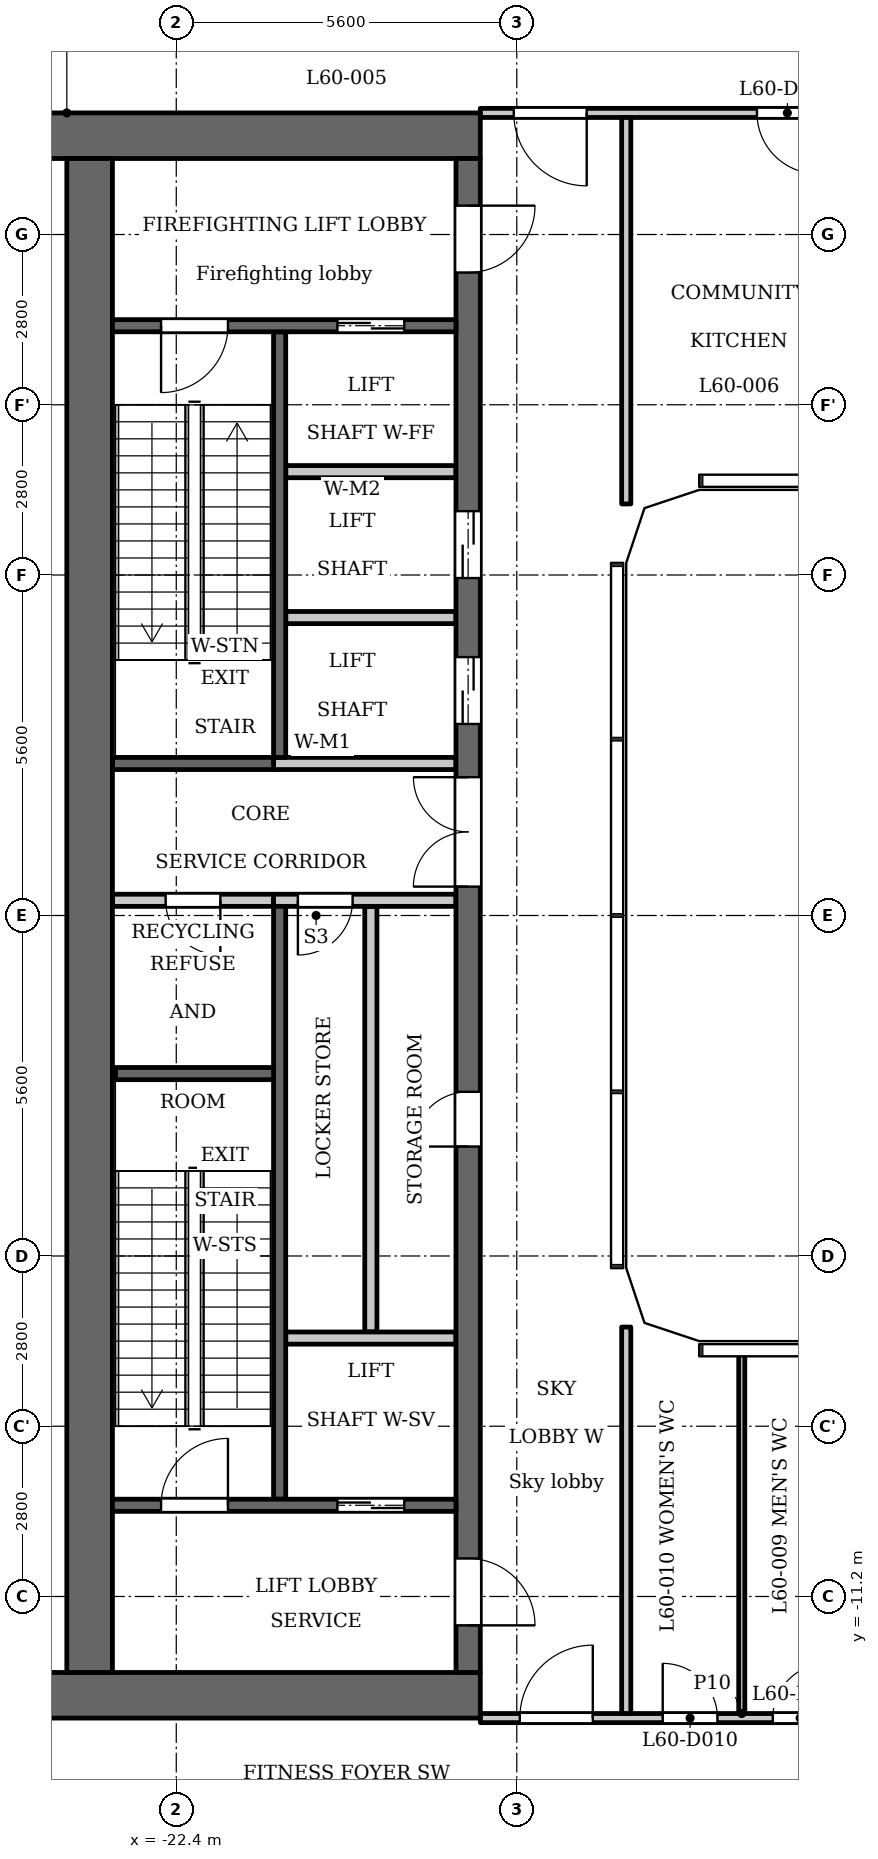
"""IFC4 building model, lengths in metres.
Left out: names, types, materials, properties, quantities, classifications, styles, units other than length and angle.
Written with IfcOpenShell. Run it as: python <this file> out.ifc"""

import sys

from ifc_helpers import new_model, si_unit, direction, frame, frame_2d, origin, place, context, subcontext, project, spatial, polyline, rectangle, outline, extrude, element, fill, save


model = new_model("IFC4")
c1 = context("Model", 3, precision=1e-05, world=origin(), true_north=direction((0.0, 1.0)))
c2 = subcontext(c1, "Body", "Model", "MODEL_VIEW")
j1 = project(units=[si_unit("LENGTHUNIT", "METRE"), si_unit("PLANEANGLEUNIT", "RADIAN")], contexts=[c1])
p1 = place(None, origin())
s1 = spatial("IfcSite", under=j1, at=p1, CompositionType="ELEMENT")
p2 = place(p1, origin())
s2 = spatial("IfcBuilding", under=s1, at=p2, CompositionType="ELEMENT")
p3 = place(p2, frame((0.0, 0.0, 230.9)))
s3 = spatial("IfcBuildingStorey", under=s2, at=p3, CompositionType="ELEMENT", Elevation=230.9)
p4 = place(p3, frame((-20.7, 2.6, 0.0), z_axis=(0.0, 0.0, 1.0), x_axis=(0.0, 1.0, 0.0)))
e1 = element("IfcWall", 1, at=p4, inside=s3, PredefinedType="SHEAR", context=c2, shape_type="SweptSolid", body=[
    extrude(rectangle(XDim=7.0, YDim=0.2, at=frame_2d((3.5, 0.0))), origin(), (0.0, 0.0, 1.0), 4.95),
])
p5 = place(p3, frame((-20.7, -9.6, 0.0), z_axis=(0.0, 0.0, 1.0), x_axis=(0.0, 1.0, 0.0)))
e2 = element("IfcWall", 2, at=p5, inside=s3, PredefinedType="SHEAR", context=c2, shape_type="SweptSolid", body=[
    extrude(rectangle(XDim=9.75, YDim=0.2, at=frame_2d((4.875, 0.0))), origin(), (0.0, 0.0, 1.0), 4.95),
])
p6 = place(p3, frame((-20.8, 2.5, 0.0), z_axis=(0.0, 0.0, 1.0), x_axis=(-1.0, 0.0, 0.0)))
e3 = element("IfcWall", 3, at=p6, inside=s3, PredefinedType="SHEAR", context=c2, shape_type="SweptSolid", body=[
    extrude(rectangle(XDim=2.65, YDim=0.2, at=frame_2d((1.325, 0.0))), origin(), (0.0, 0.0, 1.0), 4.95),
])
p7 = place(p3, frame((-20.8, 0.25, 0.0), z_axis=(0.0, 0.0, 1.0), x_axis=(-1.0, 0.0, 0.0)))
e4 = element("IfcWall", 4, at=p7, inside=s3, PredefinedType="PARTITIONING", context=c2, shape_type="SweptSolid", body=[
    extrude(rectangle(XDim=2.65, YDim=0.2, at=frame_2d((1.325, 0.0))), origin(), (0.0, 0.0, 1.0), 4.95),
])
p8 = place(p7, frame((0.875, 0.0, 0.0)))
e5 = element("IfcOpeningElement", 5, at=p8, cuts=e4, PredefinedType="OPENING", context=c2, shape_type="SweptSolid", body=[
    extrude(rectangle(XDim=0.9, YDim=2.1, at=frame_2d((0.45, 1.05))), frame((0.0, 0.11, 0.0), z_axis=(0.0, -1.0, 0.0), x_axis=(1.0, 0.0, 0.0)), (0.0, 0.0, 1.0), 0.22),
])
for number, where, z_axis, x_axis in (
    (6, (-17.4, 12.825, 0.0), (0.0, 0.0, 1.0), (-1.0, 0.0, 0.0)),
    (7, (-17.4, -12.825, 0.0), (0.0, 0.0, 1.0), (-1.0, 0.0, 0.0)),
):
    element("IfcWall", number, at=place(p3, frame(where, z_axis=z_axis, x_axis=x_axis)), inside=s3, PredefinedType="SHEAR", context=c2, shape_type="SweptSolid", body=[
        extrude(rectangle(XDim=7.6, YDim=0.75, at=frame_2d((3.8, 0.0))), origin(), (0.0, 0.0, 1.0), 4.95),
    ])
p9 = place(p3, frame((-19.2, -6.85, 0.0), z_axis=(0.0, 0.0, 1.0), x_axis=(0.0, 1.0, 0.0)))
e8 = element("IfcWall", 8, at=p9, inside=s3, PredefinedType="PARTITIONING", context=c2, shape_type="SweptSolid", body=[
    extrude(rectangle(XDim=7.0, YDim=0.2, at=frame_2d((3.5, 0.0))), origin(), (0.0, 0.0, 1.0), 4.95),
])
p10 = place(p3, frame((-17.6, -12.45, 0.0), z_axis=(0.0, 0.0, 1.0), x_axis=(0.0, 1.0, 0.0)))
e9 = element("IfcWall", 9, at=p10, inside=s3, PredefinedType="SHEAR", context=c2, shape_type="SweptSolid", body=[
    extrude(rectangle(XDim=24.9, YDim=0.4, at=frame_2d((12.45, 0.0))), origin(), (0.0, 0.0, 1.0), 4.95),
])
p11 = place(p10, frame((8.65, 0.0, 0.0)))
e10 = element("IfcOpeningElement", 10, at=p11, cuts=e9, PredefinedType="OPENING", context=c2, shape_type="SweptSolid", body=[
    extrude(rectangle(XDim=0.9, YDim=2.1, at=frame_2d((0.45, 1.05))), frame((0.0, 0.21, 0.0), z_axis=(0.0, -1.0, 0.0), x_axis=(1.0, 0.0, 0.0)), (0.0, 0.0, 1.0), 0.42),
])
p12 = place(p10, frame((15.6, 0.0, 0.0)))
e11 = element("IfcOpeningElement", 11, at=p12, cuts=e9, PredefinedType="OPENING", context=c2, shape_type="SweptSolid", body=[
    extrude(rectangle(XDim=1.1, YDim=2.1, at=frame_2d((0.55, 1.05))), frame((0.0, 0.21, 0.0), z_axis=(0.0, -1.0, 0.0), x_axis=(1.0, 0.0, 0.0)), (0.0, 0.0, 1.0), 0.42),
])
p13 = place(p10, frame((18.0, 0.0, 0.0)))
e12 = element("IfcOpeningElement", 12, at=p13, cuts=e9, PredefinedType="OPENING", context=c2, shape_type="SweptSolid", body=[
    extrude(rectangle(XDim=1.1, YDim=2.1, at=frame_2d((0.55, 1.05))), frame((0.0, 0.21, 0.0), z_axis=(0.0, -1.0, 0.0), x_axis=(1.0, 0.0, 0.0)), (0.0, 0.0, 1.0), 0.42),
])
p14 = place(p10, frame((23.025, 0.0, 0.0)))
e13 = element("IfcOpeningElement", 13, at=p14, cuts=e9, PredefinedType="OPENING", context=c2, shape_type="SweptSolid", body=[
    extrude(rectangle(XDim=1.1, YDim=2.1, at=frame_2d((0.55, 1.05))), frame((0.0, 0.21, 0.0), z_axis=(0.0, -1.0, 0.0), x_axis=(1.0, 0.0, 0.0)), (0.0, 0.0, 1.0), 0.42),
])
p15 = place(p10, frame((0.775, 0.0, 0.0)))
e14 = element("IfcOpeningElement", 14, at=p15, cuts=e9, PredefinedType="OPENING", context=c2, shape_type="SweptSolid", body=[
    extrude(rectangle(XDim=1.1, YDim=2.1, at=frame_2d((0.55, 1.05))), frame((0.0, 0.21, 0.0), z_axis=(0.0, -1.0, 0.0), x_axis=(1.0, 0.0, 0.0)), (0.0, 0.0, 1.0), 0.42),
])
p16 = place(p10, frame((12.925, 0.0, 0.0)))
e15 = element("IfcOpeningElement", 15, at=p16, cuts=e9, PredefinedType="OPENING", context=c2, shape_type="SweptSolid", body=[
    extrude(rectangle(XDim=1.8, YDim=2.1, at=frame_2d((0.9, 1.05))), frame((0.0, 0.21, 0.0), z_axis=(0.0, -1.0, 0.0), x_axis=(1.0, 0.0, 0.0)), (0.0, 0.0, 1.0), 0.42),
])
p17 = place(p3, frame((-23.825, -12.45, 0.0), z_axis=(0.0, 0.0, 1.0), x_axis=(0.0, 1.0, 0.0)))
e16 = element("IfcWall", 16, at=p17, inside=s3, PredefinedType="SHEAR", context=c2, shape_type="SweptSolid", body=[
    extrude(rectangle(XDim=24.9, YDim=0.75, at=frame_2d((12.45, 0.0))), origin(), (0.0, 0.0, 1.0), 4.95),
])
p18 = place(p3, frame((-17.8, -9.7, 0.0), z_axis=(0.0, 0.0, 1.0), x_axis=(-1.0, 0.0, 0.0)))
e17 = element("IfcWall", 17, at=p18, inside=s3, PredefinedType="SHEAR", context=c2, shape_type="SweptSolid", body=[
    extrude(rectangle(XDim=5.65, YDim=0.2, at=frame_2d((2.825, 0.0))), origin(), (0.0, 0.0, 1.0), 4.95),
])
p19 = place(p18, frame((0.85, 0.0, 0.0)))
e18 = element("IfcOpeningElement", 18, at=p19, cuts=e17, PredefinedType="OPENING", context=c2, shape_type="SweptSolid", body=[
    extrude(rectangle(XDim=1.1, YDim=2.1, at=frame_2d((0.55, 1.05))), frame((0.0, 0.11, 0.0), z_axis=(0.0, -1.0, 0.0), x_axis=(1.0, 0.0, 0.0)), (0.0, 0.0, 1.0), 0.22),
])
p20 = place(p18, frame((3.75, 0.0, 0.0)))
e19 = element("IfcOpeningElement", 19, at=p20, cuts=e17, PredefinedType="OPENING", context=c2, shape_type="SweptSolid", body=[
    extrude(rectangle(XDim=1.1, YDim=2.1, at=frame_2d((0.55, 1.05))), frame((0.0, 0.11, 0.0), z_axis=(0.0, -1.0, 0.0), x_axis=(1.0, 0.0, 0.0)), (0.0, 0.0, 1.0), 0.22),
])
p21 = place(p3, frame((-17.8, -6.95, 0.0), z_axis=(0.0, 0.0, 1.0), x_axis=(-1.0, 0.0, 0.0)))
e20 = element("IfcWall", 20, at=p21, inside=s3, PredefinedType="PARTITIONING", context=c2, shape_type="SweptSolid", body=[
    extrude(rectangle(XDim=2.8, YDim=0.2, at=frame_2d((1.4, 0.0))), origin(), (0.0, 0.0, 1.0), 4.95),
])
p22 = place(p3, frame((-17.8, 0.25, 0.0), z_axis=(0.0, 0.0, 1.0), x_axis=(-1.0, 0.0, 0.0)))
e21 = element("IfcWall", 21, at=p22, inside=s3, PredefinedType="PARTITIONING", context=c2, shape_type="SweptSolid", body=[
    extrude(rectangle(XDim=3.0, YDim=0.2, at=frame_2d((1.5, 0.0))), origin(), (0.0, 0.0, 1.0), 4.95),
])
p23 = place(p22, frame((1.7, 0.0, 0.0)))
e22 = element("IfcOpeningElement", 22, at=p23, cuts=e21, PredefinedType="OPENING", context=c2, shape_type="SweptSolid", body=[
    extrude(rectangle(XDim=0.9, YDim=2.1, at=frame_2d((0.45, 1.05))), frame((0.0, 0.11, 0.0), z_axis=(0.0, -1.0, 0.0), x_axis=(1.0, 0.0, 0.0)), (0.0, 0.0, 1.0), 0.22),
])
p24 = place(p3, frame((-17.8, 2.5, 0.0), z_axis=(0.0, 0.0, 1.0), x_axis=(-1.0, 0.0, 0.0)))
e23 = element("IfcWall", 23, at=p24, inside=s3, PredefinedType="PARTITIONING", context=c2, shape_type="SweptSolid", body=[
    extrude(rectangle(XDim=3.0, YDim=0.2, at=frame_2d((1.5, 0.0))), origin(), (0.0, 0.0, 1.0), 4.95),
])
for number, where, z_axis, x_axis in (
    (24, (-17.8, 4.9, 0.0), (0.0, 0.0, 1.0), (-1.0, 0.0, 0.0)),
    (25, (-17.8, 7.3, 0.0), (0.0, 0.0, 1.0), (-1.0, 0.0, 0.0)),
):
    element("IfcWall", number, at=place(p3, frame(where, z_axis=z_axis, x_axis=x_axis)), inside=s3, PredefinedType="PARTITIONING", context=c2, shape_type="SweptSolid", body=[
        extrude(rectangle(XDim=2.8, YDim=0.2, at=frame_2d((1.4, 0.0))), origin(), (0.0, 0.0, 1.0), 4.95),
    ])
p25 = place(p3, frame((-17.8, 9.7, 0.0), z_axis=(0.0, 0.0, 1.0), x_axis=(-1.0, 0.0, 0.0)))
e26 = element("IfcWall", 26, at=p25, inside=s3, PredefinedType="SHEAR", context=c2, shape_type="SweptSolid", body=[
    extrude(rectangle(XDim=5.65, YDim=0.2, at=frame_2d((2.825, 0.0))), origin(), (0.0, 0.0, 1.0), 4.95),
])
p26 = place(p25, frame((0.85, 0.0, 0.0)))
e27 = element("IfcOpeningElement", 27, at=p26, cuts=e26, PredefinedType="OPENING", context=c2, shape_type="SweptSolid", body=[
    extrude(rectangle(XDim=1.1, YDim=2.1, at=frame_2d((0.55, 1.05))), frame((0.0, 0.11, 0.0), z_axis=(0.0, -1.0, 0.0), x_axis=(1.0, 0.0, 0.0)), (0.0, 0.0, 1.0), 0.22),
])
p27 = place(p25, frame((3.75, 0.0, 0.0)))
e28 = element("IfcOpeningElement", 28, at=p27, cuts=e26, PredefinedType="OPENING", context=c2, shape_type="SweptSolid", body=[
    extrude(rectangle(XDim=1.1, YDim=2.1, at=frame_2d((0.55, 1.05))), frame((0.0, 0.11, 0.0), z_axis=(0.0, -1.0, 0.0), x_axis=(1.0, 0.0, 0.0)), (0.0, 0.0, 1.0), 0.22),
])
p28 = place(p3, frame((-20.8, -2.6, 0.0), z_axis=(0.0, 0.0, 1.0), x_axis=(-1.0, 0.0, 0.0)))
e29 = element("IfcWall", 29, at=p28, inside=s3, PredefinedType="SHEAR", context=c2, shape_type="SweptSolid", body=[
    extrude(rectangle(XDim=2.6, YDim=0.2, at=frame_2d((1.3, 0.0))), origin(), (0.0, 0.0, 1.0), 4.95),
])
p29 = place(p3, frame((-17.4, -13.2, 0.0), z_axis=(0.0, 0.0, 1.0), x_axis=(1.0, 0.0, 0.0)))
e30 = element("IfcWall", 30, at=p29, inside=s3, PredefinedType="PARTITIONING", context=c2, shape_type="SweptSolid", body=[
    extrude(rectangle(XDim=6.016, YDim=0.15, at=frame_2d((3.008, 0.0))), origin(), (0.0, 0.0, 1.0), 4.95),
])
p30 = place(p29, frame((0.65, 0.0, 0.0)))
e31 = element("IfcOpeningElement", 31, at=p30, cuts=e30, PredefinedType="OPENING", context=c2, shape_type="SweptSolid", body=[
    extrude(rectangle(XDim=1.2, YDim=2.1, at=frame_2d((0.6, 1.05))), frame((0.0, 0.085, 0.0), z_axis=(0.0, -1.0, 0.0), x_axis=(1.0, 0.0, 0.0)), (0.0, 0.0, 1.0), 0.17),
])
p31 = place(p29, frame((4.81, 0.0, 0.0)))
e32 = element("IfcOpeningElement", 32, at=p31, cuts=e30, PredefinedType="OPENING", context=c2, shape_type="SweptSolid", body=[
    extrude(rectangle(XDim=0.9, YDim=2.1, at=frame_2d((0.45, 1.05))), frame((0.0, 0.085, 0.0), z_axis=(0.0, -1.0, 0.0), x_axis=(1.0, 0.0, 0.0)), (0.0, 0.0, 1.0), 0.17),
])
p32 = place(p29, frame((3.0, 0.0, 0.0)))
e33 = element("IfcOpeningElement", 33, at=p32, cuts=e30, PredefinedType="OPENING", context=c2, shape_type="SweptSolid", body=[
    extrude(rectangle(XDim=0.9, YDim=2.1, at=frame_2d((0.45, 1.05))), frame((0.0, 0.085, 0.0), z_axis=(0.0, -1.0, 0.0), x_axis=(1.0, 0.0, 0.0)), (0.0, 0.0, 1.0), 0.17),
])
p33 = place(p3, frame((-17.4, 13.2, 0.0), z_axis=(0.0, 0.0, 1.0), x_axis=(1.0, 0.0, 0.0)))
e34 = element("IfcWall", 34, at=p33, inside=s3, PredefinedType="PARTITIONING", context=c2, shape_type="SweptSolid", body=[
    extrude(rectangle(XDim=6.016, YDim=0.15, at=frame_2d((3.008, 0.0))), origin(), (0.0, 0.0, 1.0), 4.95),
])
p34 = place(p33, frame((0.55, 0.0, 0.0)))
e35 = element("IfcOpeningElement", 35, at=p34, cuts=e34, PredefinedType="OPENING", context=c2, shape_type="SweptSolid", body=[
    extrude(rectangle(XDim=1.2, YDim=2.1, at=frame_2d((0.6, 1.05))), frame((0.0, 0.085, 0.0), z_axis=(0.0, -1.0, 0.0), x_axis=(1.0, 0.0, 0.0)), (0.0, 0.0, 1.0), 0.17),
])
p35 = place(p33, frame((4.55, 0.0, 0.0)))
e36 = element("IfcOpeningElement", 36, at=p35, cuts=e34, PredefinedType="OPENING", context=c2, shape_type="SweptSolid", body=[
    extrude(rectangle(XDim=1.0, YDim=2.1, at=frame_2d((0.5, 1.05))), frame((0.0, 0.085, 0.0), z_axis=(0.0, -1.0, 0.0), x_axis=(1.0, 0.0, 0.0)), (0.0, 0.0, 1.0), 0.17),
])
for number, where, z_axis, x_axis in (
    (37, (-15.0, -13.125, 0.0), (0.0, 0.0, 1.0), (0.0, 1.0, 0.0)),
    (38, (-15.0, 6.769, 0.0), (0.0, 0.0, 1.0), (0.0, 1.0, 0.0)),
):
    element("IfcWall", number, at=place(p3, frame(where, z_axis=z_axis, x_axis=x_axis)), inside=s3, PredefinedType="PARTITIONING", context=c2, shape_type="SweptSolid", body=[
        extrude(rectangle(XDim=6.356, YDim=0.15, at=frame_2d((3.178, 0.0))), origin(), (0.0, 0.0, 1.0), 4.95),
    ])
p36 = place(p3, frame((-13.1, -13.125, 0.0), z_axis=(0.0, 0.0, 1.0), x_axis=(0.0, 1.0, 0.0)))
e39 = element("IfcWall", 39, at=p36, inside=s3, PredefinedType="PARTITIONING", context=c2, shape_type="SweptSolid", body=[
    extrude(rectangle(XDim=5.941, YDim=0.1, at=frame_2d((2.97, 0.0))), origin(), (0.0, 0.0, 1.0), 4.95),
])
p37 = place(p3, origin())
e40 = element("IfcWall", 40, at=p37, inside=s3, PredefinedType="SOLIDWALL", context=c2, shape_type="SweptSolid", body=[
    extrude(outline(polyline([(-15.0, 5.8), (-14.7, 6.7), (-13.8, 7.0), (-13.8, 7.3), (-13.849, 7.3), (-14.937, 6.937), (-15.3, 5.849), (-15.3, 5.8), (-15.0, 5.8)])), origin(), (0.0, 0.0, 1.0), 4.95),
])
e41 = element("IfcWall", 41, at=p37, inside=s3, PredefinedType="SOLIDWALL", context=c2, shape_type="SweptSolid", body=[
    extrude(outline(polyline([(-13.8, -7.0), (-14.7, -6.7), (-15.0, -5.8), (-15.3, -5.8), (-15.3, -5.849), (-14.937, -6.937), (-13.849, -7.3), (-13.8, -7.3), (-13.8, -7.0)])), origin(), (0.0, 0.0, 1.0), 4.95),
])
p38 = place(p19, origin())
e42 = element("IfcDoor", 42, at=p38, inside=s3, OperationType="DOUBLE_DOOR_SLIDING", PredefinedType="DOOR", context=c2, shape_type="SweptSolid", body=[
    extrude(rectangle(XDim=1.1, YDim=2.1, at=frame_2d((0.55, 1.05))), frame((0.0, 0.025, 0.0), z_axis=(0.0, -1.0, 0.0), x_axis=(1.0, 0.0, 0.0)), (0.0, 0.0, 1.0), 0.05),
])
fill(e18, e42)
p39 = place(p11, origin())
e43 = element("IfcDoor", 43, at=p39, inside=s3, OperationType="SINGLE_SWING_RIGHT", PredefinedType="DOOR", context=c2, shape_type="SweptSolid", body=[
    extrude(rectangle(XDim=0.9, YDim=2.1, at=frame_2d((0.45, 1.05))), frame((0.0, 0.025, 0.0), z_axis=(0.0, -1.0, 0.0), x_axis=(1.0, 0.0, 0.0)), (0.0, 0.0, 1.0), 0.05),
])
fill(e10, e43)
p40 = place(p23, origin())
e44 = element("IfcDoor", 44, at=p40, inside=s3, OperationType="SINGLE_SWING_LEFT", PredefinedType="DOOR", context=c2, shape_type="SweptSolid", body=[
    extrude(rectangle(XDim=0.9, YDim=2.1, at=frame_2d((0.45, 1.05))), frame((0.0, 0.025, 0.0), z_axis=(0.0, -1.0, 0.0), x_axis=(1.0, 0.0, 0.0)), (0.0, 0.0, 1.0), 0.05),
])
fill(e22, e44)
p41 = place(p12, origin())
e45 = element("IfcDoor", 45, at=p41, inside=s3, OperationType="DOUBLE_DOOR_SLIDING", PredefinedType="DOOR", context=c2, shape_type="SweptSolid", body=[
    extrude(rectangle(XDim=1.1, YDim=2.1, at=frame_2d((0.55, 1.05))), frame((0.0, 0.025, 0.0), z_axis=(0.0, -1.0, 0.0), x_axis=(1.0, 0.0, 0.0)), (0.0, 0.0, 1.0), 0.05),
])
fill(e11, e45)
p42 = place(p13, origin())
e46 = element("IfcDoor", 46, at=p42, inside=s3, OperationType="DOUBLE_DOOR_SLIDING", PredefinedType="DOOR", context=c2, shape_type="SweptSolid", body=[
    extrude(rectangle(XDim=1.1, YDim=2.1, at=frame_2d((0.55, 1.05))), frame((0.0, 0.025, 0.0), z_axis=(0.0, -1.0, 0.0), x_axis=(1.0, 0.0, 0.0)), (0.0, 0.0, 1.0), 0.05),
])
fill(e12, e46)
p43 = place(p26, origin())
e47 = element("IfcDoor", 47, at=p43, inside=s3, OperationType="DOUBLE_DOOR_SLIDING", PredefinedType="DOOR", context=c2, shape_type="SweptSolid", body=[
    extrude(rectangle(XDim=1.1, YDim=2.1, at=frame_2d((0.55, 1.05))), frame((0.0, 0.025, 0.0), z_axis=(0.0, -1.0, 0.0), x_axis=(1.0, 0.0, 0.0)), (0.0, 0.0, 1.0), 0.05),
])
fill(e27, e47)
p44 = place(p14, origin())
e48 = element("IfcDoor", 48, at=p44, inside=s3, OperationType="SINGLE_SWING_RIGHT", PredefinedType="DOOR", context=c2, shape_type="SweptSolid", body=[
    extrude(rectangle(XDim=1.1, YDim=2.1, at=frame_2d((0.55, 1.05))), frame((0.0, 0.025, 0.0), z_axis=(0.0, -1.0, 0.0), x_axis=(1.0, 0.0, 0.0)), (0.0, 0.0, 1.0), 0.05),
])
fill(e13, e48)
p45 = place(p15, origin())
e49 = element("IfcDoor", 49, at=p45, inside=s3, OperationType="SINGLE_SWING_LEFT", PredefinedType="DOOR", context=c2, shape_type="SweptSolid", body=[
    extrude(rectangle(XDim=1.1, YDim=2.1, at=frame_2d((0.55, 1.05))), frame((0.0, 0.025, 0.0), z_axis=(0.0, -1.0, 0.0), x_axis=(1.0, 0.0, 0.0)), (0.0, 0.0, 1.0), 0.05),
])
fill(e14, e49)
p46 = place(p27, origin())
e50 = element("IfcDoor", 50, at=p46, inside=s3, OperationType="SINGLE_SWING_LEFT", PredefinedType="DOOR", context=c2, shape_type="SweptSolid", body=[
    extrude(rectangle(XDim=1.1, YDim=2.1, at=frame_2d((0.55, 1.05))), frame((0.0, 0.025, 0.0), z_axis=(0.0, -1.0, 0.0), x_axis=(1.0, 0.0, 0.0)), (0.0, 0.0, 1.0), 0.05),
])
fill(e28, e50)
p47 = place(p20, origin())
e51 = element("IfcDoor", 51, at=p47, inside=s3, OperationType="SINGLE_SWING_LEFT", PredefinedType="DOOR", context=c2, shape_type="SweptSolid", body=[
    extrude(rectangle(XDim=1.1, YDim=2.1, at=frame_2d((0.55, 1.05))), frame((0.0, 0.025, 0.0), z_axis=(0.0, -1.0, 0.0), x_axis=(1.0, 0.0, 0.0)), (0.0, 0.0, 1.0), 0.05),
])
fill(e19, e51)
p48 = place(p16, origin())
e52 = element("IfcDoor", 52, at=p48, inside=s3, OperationType="DOUBLE_DOOR_SINGLE_SWING", PredefinedType="DOOR", context=c2, shape_type="SweptSolid", body=[
    extrude(rectangle(XDim=1.8, YDim=2.1, at=frame_2d((0.9, 1.05))), frame((0.0, 0.025, 0.0), z_axis=(0.0, -1.0, 0.0), x_axis=(1.0, 0.0, 0.0)), (0.0, 0.0, 1.0), 0.05),
])
fill(e15, e52)
p49 = place(p8, origin())
e53 = element("IfcDoor", 53, at=p49, inside=s3, OperationType="SINGLE_SWING_RIGHT", PredefinedType="DOOR", context=c2, shape_type="SweptSolid", body=[
    extrude(rectangle(XDim=0.9, YDim=2.1, at=frame_2d((0.45, 1.05))), frame((0.0, 0.025, 0.0), z_axis=(0.0, -1.0, 0.0), x_axis=(1.0, 0.0, 0.0)), (0.0, 0.0, 1.0), 0.05),
])
fill(e5, e53)
p50 = place(p34, origin())
e54 = element("IfcDoor", 54, at=p50, inside=s3, OperationType="SINGLE_SWING_RIGHT", PredefinedType="DOOR", context=c2, shape_type="SweptSolid", body=[
    extrude(rectangle(XDim=1.2, YDim=2.1, at=frame_2d((0.6, 1.05))), frame((0.0, 0.025, 0.0), z_axis=(0.0, -1.0, 0.0), x_axis=(1.0, 0.0, 0.0)), (0.0, 0.0, 1.0), 0.05),
])
fill(e35, e54)
p51 = place(p35, origin())
e55 = element("IfcDoor", 55, at=p51, inside=s3, OperationType="SINGLE_SWING_RIGHT", PredefinedType="DOOR", context=c2, shape_type="SweptSolid", body=[
    extrude(rectangle(XDim=1.0, YDim=2.1, at=frame_2d((0.5, 1.05))), frame((0.0, 0.025, 0.0), z_axis=(0.0, -1.0, 0.0), x_axis=(1.0, 0.0, 0.0)), (0.0, 0.0, 1.0), 0.05),
])
fill(e36, e55)
p52 = place(p30, origin())
e56 = element("IfcDoor", 56, at=p52, inside=s3, OperationType="SINGLE_SWING_LEFT", PredefinedType="DOOR", context=c2, shape_type="SweptSolid", body=[
    extrude(rectangle(XDim=1.2, YDim=2.1, at=frame_2d((0.6, 1.05))), frame((0.0, 0.025, 0.0), z_axis=(0.0, -1.0, 0.0), x_axis=(1.0, 0.0, 0.0)), (0.0, 0.0, 1.0), 0.05),
])
fill(e31, e56)
p53 = place(p31, origin())
e57 = element("IfcDoor", 57, at=p53, inside=s3, OperationType="SINGLE_SWING_LEFT", PredefinedType="DOOR", context=c2, shape_type="SweptSolid", body=[
    extrude(rectangle(XDim=0.9, YDim=2.1, at=frame_2d((0.45, 1.05))), frame((0.0, 0.025, 0.0), z_axis=(0.0, -1.0, 0.0), x_axis=(1.0, 0.0, 0.0)), (0.0, 0.0, 1.0), 0.05),
])
fill(e32, e57)
p54 = place(p32, origin())
e58 = element("IfcDoor", 58, at=p54, inside=s3, OperationType="SINGLE_SWING_RIGHT", PredefinedType="DOOR", context=c2, shape_type="SweptSolid", body=[
    extrude(rectangle(XDim=0.9, YDim=2.1, at=frame_2d((0.45, 1.05))), frame((0.0, 0.025, 0.0), z_axis=(0.0, -1.0, 0.0), x_axis=(1.0, 0.0, 0.0)), (0.0, 0.0, 1.0), 0.05),
])
fill(e33, e58)
save(model, sys.argv[1])
